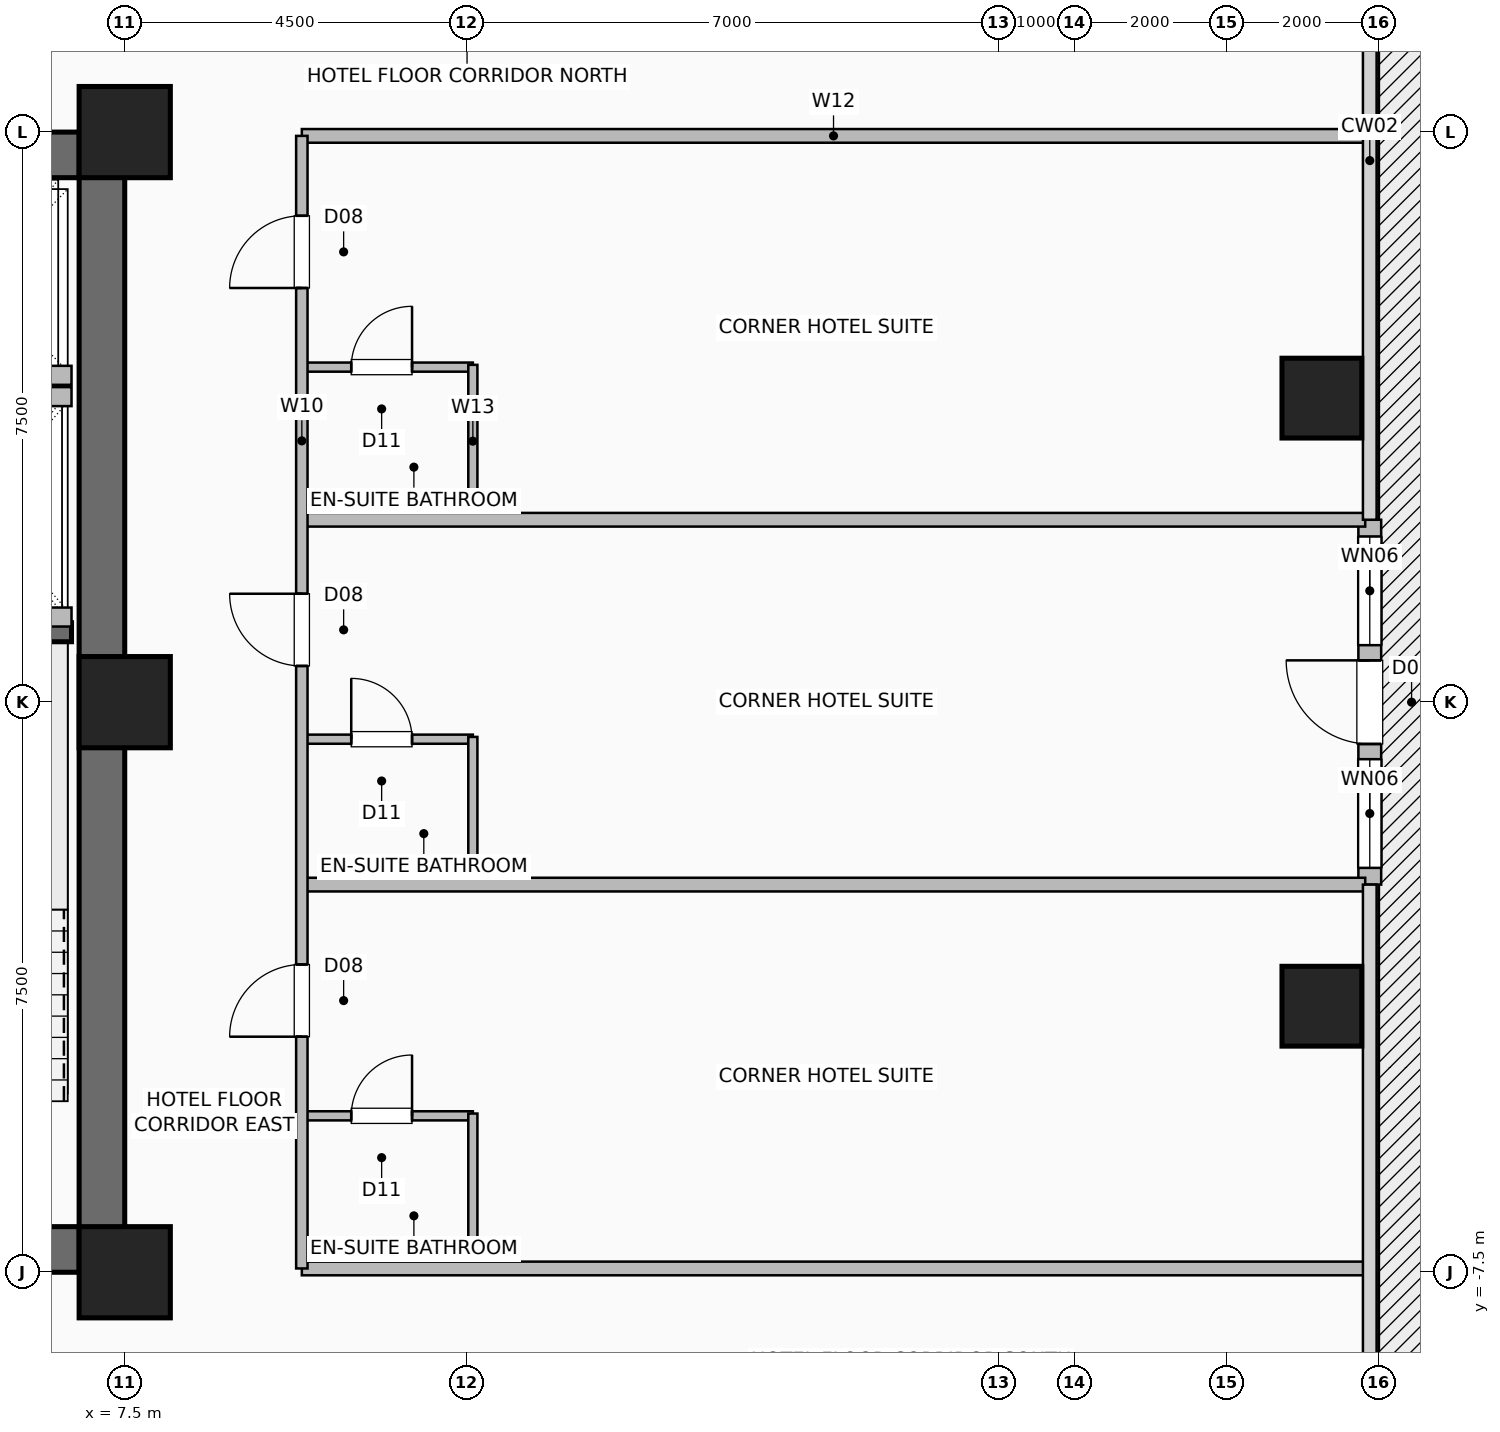
"""IFC4 building model, lengths in metres.
Left out: names, types, materials, properties, quantities, classifications, styles, units other than length and angle.
Written with IfcOpenShell. Run it as: python <this file> out.ifc"""

import sys

from ifc_helpers import new_model, si_unit, direction, frame, frame_2d, origin, origin_2d, place, context, subcontext, project, spatial, rectangle, hollow_rectangle, extrude, element, fill, save


model = new_model("IFC4")
c1 = context("Model", 3, precision=1e-05, world=origin(), true_north=direction((0.0, 1.0)))
c2 = subcontext(c1, "Body", "Model", "MODEL_VIEW")
j1 = project(units=[si_unit("LENGTHUNIT", "METRE"), si_unit("PLANEANGLEUNIT", "RADIAN")], contexts=[c1])
p1 = place(None, origin())
s1 = spatial("IfcSite", under=j1, at=p1, CompositionType="ELEMENT")
p2 = place(p1, origin())
s2 = spatial("IfcBuilding", under=s1, at=p2, CompositionType="ELEMENT")
p3 = place(p2, frame((0.0, 0.0, 55.0)))
s3 = spatial("IfcBuildingStorey", under=s2, at=p3, CompositionType="ELEMENT", Elevation=55.0)
for number, where, z_axis, x_axis in (
    (1, (7.5, -7.5, 0.0), (0.0, 0.0, 1.0), (1.0, 0.0, 0.0)),
    (2, (7.5, 0.0, 0.0), (0.0, 0.0, 1.0), (1.0, 0.0, 0.0)),
    (3, (7.5, 7.5, 0.0), (0.0, 0.0, 1.0), (1.0, 0.0, 0.0)),
):
    element("IfcColumn", number, at=place(p3, frame(where, z_axis=z_axis, x_axis=x_axis)), inside=s3, PredefinedType="COLUMN", context=c2, shape_type="SweptSolid", body=[
        extrude(hollow_rectangle(XDim=1.2, YDim=1.2, WallThickness=0.055, at=origin_2d()), origin(), (0.0, 0.0, 1.0), 3.5),
    ])
for number, where, z_axis, x_axis in (
    (4, (23.25, -4.0, 0.0), (0.0, 0.0, 1.0), (1.0, 0.0, 0.0)),
    (5, (23.25, 4.0, 0.0), (0.0, 0.0, 1.0), (1.0, 0.0, 0.0)),
):
    element("IfcColumn", number, at=place(p3, frame(where, z_axis=z_axis, x_axis=x_axis)), inside=s3, PredefinedType="COLUMN", context=c2, shape_type="SweptSolid", body=[
        extrude(hollow_rectangle(XDim=1.05, YDim=1.05, WallThickness=0.05, at=origin_2d()), origin(), (0.0, 0.0, 1.0), 3.5),
    ])
p4 = place(p3, frame((23.88, -2.4, 0.0), z_axis=(0.0, 0.0, 1.0), x_axis=(0.0, 1.0, 0.0)))
e6 = element("IfcWall", 6, at=p4, inside=s3, PredefinedType="SOLIDWALL", context=c2, shape_type="SweptSolid", body=[
    extrude(rectangle(XDim=4.8, YDim=0.3, at=frame_2d((2.4, 0.0))), origin(), (0.0, 0.0, 1.0), 3.25),
])
p5 = place(p4, frame((1.85, 0.0, 0.0)))
e7 = element("IfcOpeningElement", 7, at=p5, cuts=e6, PredefinedType="OPENING", context=c2, shape_type="SweptSolid", body=[
    extrude(rectangle(XDim=1.1, YDim=2.2, at=frame_2d((0.55, 1.1))), frame((0.0, 0.16, 0.0), z_axis=(0.0, -1.0, 0.0), x_axis=(1.0, 0.0, 0.0)), (0.0, 0.0, 1.0), 0.32),
])
p6 = place(p4, frame((0.22, 0.0, 0.85)))
e8 = element("IfcOpeningElement", 8, at=p6, cuts=e6, PredefinedType="OPENING", context=c2, shape_type="SweptSolid", body=[
    extrude(rectangle(XDim=1.43, YDim=1.8, at=frame_2d((0.715, 0.9))), frame((0.0, 0.16, 0.0), z_axis=(0.0, -1.0, 0.0), x_axis=(1.0, 0.0, 0.0)), (0.0, 0.0, 1.0), 0.32),
])
p7 = place(p4, frame((3.15, 0.0, 0.85)))
e9 = element("IfcOpeningElement", 9, at=p7, cuts=e6, PredefinedType="OPENING", context=c2, shape_type="SweptSolid", body=[
    extrude(rectangle(XDim=1.43, YDim=1.8, at=frame_2d((0.715, 0.9))), frame((0.0, 0.16, 0.0), z_axis=(0.0, -1.0, 0.0), x_axis=(1.0, 0.0, 0.0)), (0.0, 0.0, 1.0), 0.32),
])
p8 = place(p3, frame((-7.5, -7.2, 0.0), z_axis=(0.0, 0.0, 1.0), x_axis=(1.0, 0.0, 0.0)))
e10 = element("IfcWall", 10, at=p8, inside=s3, PredefinedType="SHEAR", context=c2, shape_type="SweptSolid", body=[
    extrude(rectangle(XDim=15.0, YDim=0.6, at=frame_2d((7.5, 0.0))), origin(), (0.0, 0.0, 1.0), 3.25),
])
p9 = place(p8, frame((1.55, 0.0, 0.0)))
e11 = element("IfcOpeningElement", 11, at=p9, cuts=e10, PredefinedType="OPENING", context=c2, shape_type="SweptSolid", body=[
    extrude(rectangle(XDim=1.05, YDim=2.08, at=frame_2d((0.525, 1.04))), frame((0.0, 0.31, 0.0), z_axis=(0.0, -1.0, 0.0), x_axis=(1.0, 0.0, 0.0)), (0.0, 0.0, 1.0), 0.62),
])
p10 = place(p8, frame((12.4, 0.0, 0.0)))
e12 = element("IfcOpeningElement", 12, at=p10, cuts=e10, PredefinedType="OPENING", context=c2, shape_type="SweptSolid", body=[
    extrude(rectangle(XDim=1.05, YDim=2.08, at=frame_2d((0.525, 1.04))), frame((0.0, 0.31, 0.0), z_axis=(0.0, -1.0, 0.0), x_axis=(1.0, 0.0, 0.0)), (0.0, 0.0, 1.0), 0.62),
])
p11 = place(p8, frame((4.64, 0.0, 0.0)))
e13 = element("IfcOpeningElement", 13, at=p11, cuts=e10, PredefinedType="OPENING", context=c2, shape_type="SweptSolid", body=[
    extrude(rectangle(XDim=1.1, YDim=2.2, at=frame_2d((0.55, 1.1))), frame((0.0, 0.31, 0.0), z_axis=(0.0, -1.0, 0.0), x_axis=(1.0, 0.0, 0.0)), (0.0, 0.0, 1.0), 0.62),
])
p12 = place(p8, frame((6.52, 0.0, 0.0)))
e14 = element("IfcOpeningElement", 14, at=p12, cuts=e10, PredefinedType="OPENING", context=c2, shape_type="SweptSolid", body=[
    extrude(rectangle(XDim=1.1, YDim=2.2, at=frame_2d((0.55, 1.1))), frame((0.0, 0.31, 0.0), z_axis=(0.0, -1.0, 0.0), x_axis=(1.0, 0.0, 0.0)), (0.0, 0.0, 1.0), 0.62),
])
p13 = place(p8, frame((8.4, 0.0, 0.0)))
e15 = element("IfcOpeningElement", 15, at=p13, cuts=e10, PredefinedType="OPENING", context=c2, shape_type="SweptSolid", body=[
    extrude(rectangle(XDim=1.1, YDim=2.2, at=frame_2d((0.55, 1.1))), frame((0.0, 0.31, 0.0), z_axis=(0.0, -1.0, 0.0), x_axis=(1.0, 0.0, 0.0)), (0.0, 0.0, 1.0), 0.62),
])
for number, where, z_axis, x_axis in (
    (16, (-7.5, 7.2, 0.0), (0.0, 0.0, 1.0), (1.0, 0.0, 0.0)),
    (17, (7.2, -7.5, 0.0), (0.0, 0.0, 1.0), (0.0, 1.0, 0.0)),
):
    element("IfcWall", number, at=place(p3, frame(where, z_axis=z_axis, x_axis=x_axis)), inside=s3, PredefinedType="SHEAR", context=c2, shape_type="SweptSolid", body=[
        extrude(rectangle(XDim=15.0, YDim=0.6, at=frame_2d((7.5, 0.0))), origin(), (0.0, 0.0, 1.0), 3.25),
    ])
p14 = place(p3, frame((3.47, 0.92, 0.0), z_axis=(0.0, 0.0, 1.0), x_axis=(1.0, 0.0, 0.0)))
e18 = element("IfcWall", 18, at=p14, inside=s3, PredefinedType="SHEAR", context=c2, shape_type="SweptSolid", body=[
    extrude(rectangle(XDim=3.33, YDim=0.25, at=frame_2d((1.665, 0.0))), origin(), (0.0, 0.0, 1.0), 3.25),
])
p15 = place(p3, frame((4.38, 4.3, 0.0), z_axis=(0.0, 0.0, 1.0), x_axis=(1.0, 0.0, 0.0)))
e19 = element("IfcWall", 19, at=p15, inside=s3, PredefinedType="SHEAR", context=c2, shape_type="SweptSolid", body=[
    extrude(rectangle(XDim=2.42, YDim=0.25, at=frame_2d((1.21, 0.0))), origin(), (0.0, 0.0, 1.0), 3.25),
])
for number, where, z_axis, x_axis in (
    (20, (4.28, 1.12, 0.0), (0.0, 0.0, 1.0), (1.0, 0.0, 0.0)),
    (21, (4.28, 4.02, 0.0), (0.0, 0.0, 1.0), (1.0, 0.0, 0.0)),
):
    element("IfcWall", number, at=place(p3, frame(where, z_axis=z_axis, x_axis=x_axis)), inside=s3, PredefinedType="SHEAR", context=c2, shape_type="SweptSolid", body=[
        extrude(rectangle(XDim=2.52, YDim=0.25, at=frame_2d((1.26, 0.0))), origin(), (0.0, 0.0, 1.0), 3.25),
    ])
p16 = place(p3, frame((9.83, -5.442, 0.0), z_axis=(0.0, 0.0, 1.0), x_axis=(1.0, 0.0, 0.0)))
e22 = element("IfcWall", 22, at=p16, inside=s3, PredefinedType="PLUMBINGWALL", context=c2, shape_type="SweptSolid", body=[
    extrude(rectangle(XDim=2.25, YDim=0.12, at=frame_2d((1.125, 0.0))), origin(), (0.0, 0.0, 1.0), 3.25),
])
p17 = place(p16, frame((0.65, 0.0, 0.0)))
e23 = element("IfcOpeningElement", 23, at=p17, cuts=e22, PredefinedType="OPENING", context=c2, shape_type="SweptSolid", body=[
    extrude(rectangle(XDim=0.8, YDim=2.05, at=frame_2d((0.4, 1.025))), frame((0.0, 0.07, 0.0), z_axis=(0.0, -1.0, 0.0), x_axis=(1.0, 0.0, 0.0)), (0.0, 0.0, 1.0), 0.14),
])
p18 = place(p3, frame((12.08, -7.42, 0.0), z_axis=(0.0, 0.0, 1.0), x_axis=(0.0, 1.0, 0.0)))
e24 = element("IfcWall", 24, at=p18, inside=s3, PredefinedType="PLUMBINGWALL", context=c2, shape_type="SweptSolid", body=[
    extrude(rectangle(XDim=2.008, YDim=0.12, at=frame_2d((1.004, 0.0))), origin(), (0.0, 0.0, 1.0), 3.25),
])
p19 = place(p3, frame((9.83, -0.487, 0.0), z_axis=(0.0, 0.0, 1.0), x_axis=(1.0, 0.0, 0.0)))
e25 = element("IfcWall", 25, at=p19, inside=s3, PredefinedType="PLUMBINGWALL", context=c2, shape_type="SweptSolid", body=[
    extrude(rectangle(XDim=2.25, YDim=0.12, at=frame_2d((1.125, 0.0))), origin(), (0.0, 0.0, 1.0), 3.25),
])
p20 = place(p19, frame((0.65, 0.0, 0.0)))
e26 = element("IfcOpeningElement", 26, at=p20, cuts=e25, PredefinedType="OPENING", context=c2, shape_type="SweptSolid", body=[
    extrude(rectangle(XDim=0.8, YDim=2.05, at=frame_2d((0.4, 1.025))), frame((0.0, 0.07, 0.0), z_axis=(0.0, -1.0, 0.0), x_axis=(1.0, 0.0, 0.0)), (0.0, 0.0, 1.0), 0.14),
])
p21 = place(p3, frame((12.08, -2.37, 0.0), z_axis=(0.0, 0.0, 1.0), x_axis=(0.0, 1.0, 0.0)))
e27 = element("IfcWall", 27, at=p21, inside=s3, PredefinedType="PLUMBINGWALL", context=c2, shape_type="SweptSolid", body=[
    extrude(rectangle(XDim=1.913, YDim=0.12, at=frame_2d((0.957, 0.0))), origin(), (0.0, 0.0, 1.0), 3.25),
])
p22 = place(p3, frame((9.83, 4.408, 0.0), z_axis=(0.0, 0.0, 1.0), x_axis=(1.0, 0.0, 0.0)))
e28 = element("IfcWall", 28, at=p22, inside=s3, PredefinedType="PLUMBINGWALL", context=c2, shape_type="SweptSolid", body=[
    extrude(rectangle(XDim=2.25, YDim=0.12, at=frame_2d((1.125, 0.0))), origin(), (0.0, 0.0, 1.0), 3.25),
])
p23 = place(p22, frame((0.65, 0.0, 0.0)))
e29 = element("IfcOpeningElement", 29, at=p23, cuts=e28, PredefinedType="OPENING", context=c2, shape_type="SweptSolid", body=[
    extrude(rectangle(XDim=0.8, YDim=2.05, at=frame_2d((0.4, 1.025))), frame((0.0, 0.07, 0.0), z_axis=(0.0, -1.0, 0.0), x_axis=(1.0, 0.0, 0.0)), (0.0, 0.0, 1.0), 0.14),
])
p24 = place(p3, frame((12.08, 2.43, 0.0), z_axis=(0.0, 0.0, 1.0), x_axis=(0.0, 1.0, 0.0)))
e30 = element("IfcWall", 30, at=p24, inside=s3, PredefinedType="PLUMBINGWALL", context=c2, shape_type="SweptSolid", body=[
    extrude(rectangle(XDim=2.008, YDim=0.12, at=frame_2d((1.004, 0.0))), origin(), (0.0, 0.0, 1.0), 3.25),
])
for number, where, z_axis, x_axis in (
    (31, (9.83, -7.45, 0.0), (0.0, 0.0, 1.0), (1.0, 0.0, 0.0)),
    (32, (9.83, -2.4, 0.0), (0.0, 0.0, 1.0), (1.0, 0.0, 0.0)),
    (33, (9.83, 2.4, 0.0), (0.0, 0.0, 1.0), (1.0, 0.0, 0.0)),
    (34, (9.83, 7.45, 0.0), (0.0, 0.0, 1.0), (1.0, 0.0, 0.0)),
):
    element("IfcWall", number, at=place(p3, frame(where, z_axis=z_axis, x_axis=x_axis)), inside=s3, PredefinedType="PARTITIONING", context=c2, shape_type="SweptSolid", body=[
        extrude(rectangle(XDim=13.99, YDim=0.18, at=frame_2d((6.995, 0.0))), origin(), (0.0, 0.0, 1.0), 3.25),
    ])
p25 = place(p3, frame((9.83, -7.45, 0.0), z_axis=(0.0, 0.0, 1.0), x_axis=(0.0, 1.0, 0.0)))
e35 = element("IfcWall", 35, at=p25, inside=s3, PredefinedType="PARTITIONING", context=c2, shape_type="SweptSolid", body=[
    extrude(rectangle(XDim=14.9, YDim=0.15, at=frame_2d((7.45, 0.0))), origin(), (0.0, 0.0, 1.0), 3.25),
])
p26 = place(p25, frame((3.049, 0.0, 0.0)))
e36 = element("IfcOpeningElement", 36, at=p26, cuts=e35, PredefinedType="OPENING", context=c2, shape_type="SweptSolid", body=[
    extrude(rectangle(XDim=0.95, YDim=2.08, at=frame_2d((0.475, 1.04))), frame((0.0, 0.085, 0.0), z_axis=(0.0, -1.0, 0.0), x_axis=(1.0, 0.0, 0.0)), (0.0, 0.0, 1.0), 0.17),
])
p27 = place(p25, frame((7.927, 0.0, 0.0)))
e37 = element("IfcOpeningElement", 37, at=p27, cuts=e35, PredefinedType="OPENING", context=c2, shape_type="SweptSolid", body=[
    extrude(rectangle(XDim=0.95, YDim=2.08, at=frame_2d((0.475, 1.04))), frame((0.0, 0.085, 0.0), z_axis=(0.0, -1.0, 0.0), x_axis=(1.0, 0.0, 0.0)), (0.0, 0.0, 1.0), 0.17),
])
p28 = place(p25, frame((12.899, 0.0, 0.0)))
e38 = element("IfcOpeningElement", 38, at=p28, cuts=e35, PredefinedType="OPENING", context=c2, shape_type="SweptSolid", body=[
    extrude(rectangle(XDim=0.95, YDim=2.08, at=frame_2d((0.475, 1.04))), frame((0.0, 0.085, 0.0), z_axis=(0.0, -1.0, 0.0), x_axis=(1.0, 0.0, 0.0)), (0.0, 0.0, 1.0), 0.17),
])
p29 = place(p5, origin())
e39 = element("IfcDoor", 39, at=p29, inside=s3, OperationType="SINGLE_SWING_RIGHT", PredefinedType="DOOR", context=c2, shape_type="SweptSolid", body=[
    extrude(rectangle(XDim=1.1, YDim=2.2, at=frame_2d((0.55, 1.1))), frame((0.0, 0.025, 0.0), z_axis=(0.0, -1.0, 0.0), x_axis=(1.0, 0.0, 0.0)), (0.0, 0.0, 1.0), 0.05),
])
fill(e7, e39)
p30 = place(p6, origin())
e40 = element("IfcWindow", 40, at=p30, inside=s3, PartitioningType="SINGLE_PANEL", PredefinedType="WINDOW", context=c2, shape_type="SweptSolid", body=[
    extrude(rectangle(XDim=1.43, YDim=1.8, at=frame_2d((0.715, 0.9))), frame((0.0, 0.03, 0.0), z_axis=(0.0, -1.0, 0.0), x_axis=(1.0, 0.0, 0.0)), (0.0, 0.0, 1.0), 0.06),
])
fill(e8, e40)
p31 = place(p7, origin())
e41 = element("IfcWindow", 41, at=p31, inside=s3, PartitioningType="SINGLE_PANEL", PredefinedType="WINDOW", context=c2, shape_type="SweptSolid", body=[
    extrude(rectangle(XDim=1.43, YDim=1.8, at=frame_2d((0.715, 0.9))), frame((0.0, 0.03, 0.0), z_axis=(0.0, -1.0, 0.0), x_axis=(1.0, 0.0, 0.0)), (0.0, 0.0, 1.0), 0.06),
])
fill(e9, e41)
p32 = place(p17, origin())
e42 = element("IfcDoor", 42, at=p32, inside=s3, OperationType="SINGLE_SWING_RIGHT", PredefinedType="DOOR", context=c2, shape_type="SweptSolid", body=[
    extrude(rectangle(XDim=0.8, YDim=2.05, at=frame_2d((0.4, 1.025))), frame((0.0, 0.025, 0.0), z_axis=(0.0, -1.0, 0.0), x_axis=(1.0, 0.0, 0.0)), (0.0, 0.0, 1.0), 0.05),
])
fill(e23, e42)
p33 = place(p20, origin())
e43 = element("IfcDoor", 43, at=p33, inside=s3, OperationType="SINGLE_SWING_LEFT", PredefinedType="DOOR", context=c2, shape_type="SweptSolid", body=[
    extrude(rectangle(XDim=0.8, YDim=2.05, at=frame_2d((0.4, 1.025))), frame((0.0, 0.025, 0.0), z_axis=(0.0, -1.0, 0.0), x_axis=(1.0, 0.0, 0.0)), (0.0, 0.0, 1.0), 0.05),
])
fill(e26, e43)
p34 = place(p23, origin())
e44 = element("IfcDoor", 44, at=p34, inside=s3, OperationType="SINGLE_SWING_RIGHT", PredefinedType="DOOR", context=c2, shape_type="SweptSolid", body=[
    extrude(rectangle(XDim=0.8, YDim=2.05, at=frame_2d((0.4, 1.025))), frame((0.0, 0.025, 0.0), z_axis=(0.0, -1.0, 0.0), x_axis=(1.0, 0.0, 0.0)), (0.0, 0.0, 1.0), 0.05),
])
fill(e29, e44)
p35 = place(p26, origin())
e45 = element("IfcDoor", 45, at=p35, inside=s3, OperationType="SINGLE_SWING_LEFT", PredefinedType="DOOR", context=c2, shape_type="SweptSolid", body=[
    extrude(rectangle(XDim=0.95, YDim=2.08, at=frame_2d((0.475, 1.04))), frame((0.0, 0.025, 0.0), z_axis=(0.0, -1.0, 0.0), x_axis=(1.0, 0.0, 0.0)), (0.0, 0.0, 1.0), 0.05),
])
fill(e36, e45)
p36 = place(p27, origin())
e46 = element("IfcDoor", 46, at=p36, inside=s3, OperationType="SINGLE_SWING_RIGHT", PredefinedType="DOOR", context=c2, shape_type="SweptSolid", body=[
    extrude(rectangle(XDim=0.95, YDim=2.08, at=frame_2d((0.475, 1.04))), frame((0.0, 0.025, 0.0), z_axis=(0.0, -1.0, 0.0), x_axis=(1.0, 0.0, 0.0)), (0.0, 0.0, 1.0), 0.05),
])
fill(e37, e46)
p37 = place(p28, origin())
e47 = element("IfcDoor", 47, at=p37, inside=s3, OperationType="SINGLE_SWING_LEFT", PredefinedType="DOOR", context=c2, shape_type="SweptSolid", body=[
    extrude(rectangle(XDim=0.95, YDim=2.08, at=frame_2d((0.475, 1.04))), frame((0.0, 0.025, 0.0), z_axis=(0.0, -1.0, 0.0), x_axis=(1.0, 0.0, 0.0)), (0.0, 0.0, 1.0), 0.05),
])
fill(e38, e47)
save(model, sys.argv[1])
